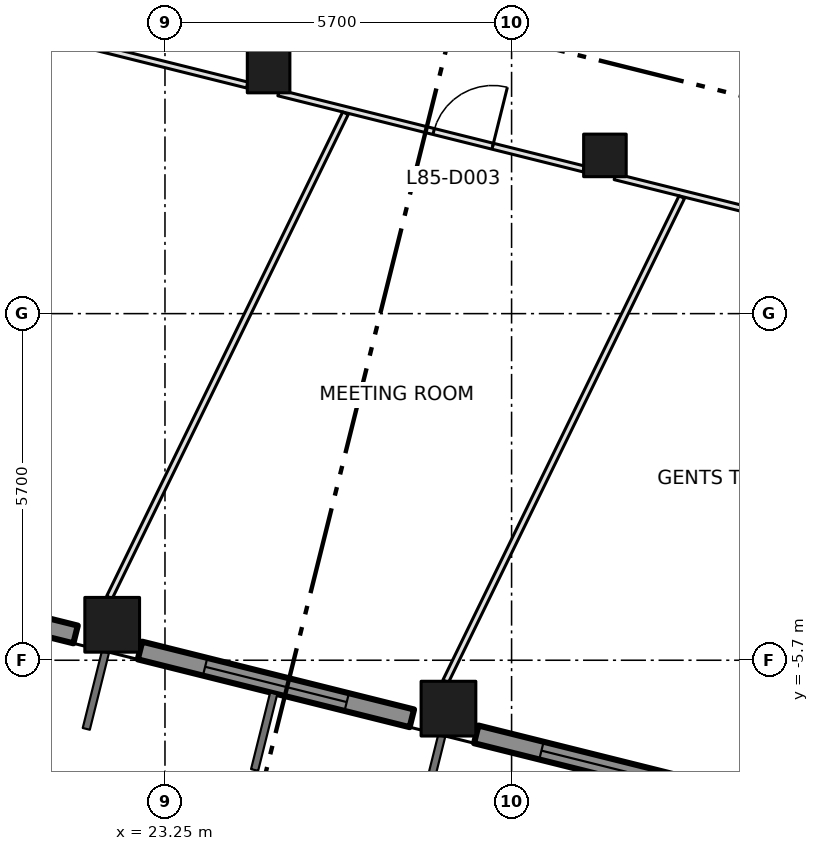
"""IFC4 building model, lengths in metres.
Left out: names, types, materials, properties, quantities, classifications, styles, units other than length and angle.
Written with IfcOpenShell. Run it as: python <this file> out.ifc"""

import sys

from ifc_helpers import new_model, si_unit, direction, frame, frame_2d, origin, origin_2d, place, context, subcontext, project, spatial, rectangle, extrude, element, fill, save


model = new_model("IFC4")
c1 = context("Model", 3, precision=1e-05, world=origin(), true_north=direction((0.0, 1.0)))
c2 = subcontext(c1, "Body", "Model", "MODEL_VIEW")
j1 = project(units=[si_unit("LENGTHUNIT", "METRE"), si_unit("PLANEANGLEUNIT", "RADIAN")], contexts=[c1])
p1 = place(None, origin())
s1 = spatial("IfcSite", under=j1, at=p1, CompositionType="ELEMENT")
p2 = place(p1, origin())
s2 = spatial("IfcBuilding", under=s1, at=p2, CompositionType="ELEMENT")
p3 = place(p2, frame((0.0, 0.0, 370.8)))
s3 = spatial("IfcBuildingStorey", under=s2, at=p3, CompositionType="ELEMENT", Elevation=370.8)
for number, where, z_axis, x_axis in (
    (1, (22.382, -5.117, 0.0), (0.0, 0.0, 1.0), (1.0, 0.0, 0.0)),
    (2, (27.912, -6.496, 0.0), (0.0, 0.0, 1.0), (1.0, 0.0, 0.0)),
):
    element("IfcColumn", number, at=place(p3, frame(where, z_axis=z_axis, x_axis=x_axis)), inside=s3, PredefinedType="COLUMN", context=c2, shape_type="SweptSolid", body=[
        extrude(rectangle(XDim=0.9, YDim=0.9, at=origin_2d()), origin(), (0.0, 0.0, 1.0), 4.2),
    ])
for number, where, z_axis, x_axis in (
    (3, (24.954, 3.981, 0.0), (0.0, 0.0, 1.0), (1.0, 0.0, 0.0)),
    (4, (30.485, 2.602, 0.0), (0.0, 0.0, 1.0), (1.0, 0.0, 0.0)),
):
    element("IfcColumn", number, at=place(p3, frame(where, z_axis=z_axis, x_axis=x_axis)), inside=s3, PredefinedType="COLUMN", context=c2, shape_type="SweptSolid", body=[
        extrude(rectangle(XDim=0.7, YDim=0.7, at=origin_2d()), origin(), (0.0, 0.0, 1.0), 4.2),
    ])
p4 = place(p3, frame((17.308, -4.161, 0.0), z_axis=(0.0, 0.0, 1.0), x_axis=(0.970294992984, -0.241924836652, 0.0)))
e5 = element("IfcWall", 5, at=p4, inside=s3, PredefinedType="SOLIDWALL", context=c2, shape_type="SweptSolid", body=[
    extrude(rectangle(XDim=4.609, YDim=0.3, at=frame_2d((2.304, 0.0))), origin(), (0.0, 0.0, 1.0), 3.2),
])
p5 = place(p4, frame((1.105, 0.0, 0.8)))
e6 = element("IfcOpeningElement", 6, at=p5, cuts=e5, PredefinedType="OPENING", context=c2, shape_type="SweptSolid", body=[
    extrude(rectangle(XDim=2.4, YDim=2.1, at=frame_2d((1.2, 1.05))), frame((0.0, 0.16, 0.0), z_axis=(0.0, -1.0, 0.0), x_axis=(1.0, 0.0, 0.0)), (0.0, 0.0, 1.0), 0.32),
])
p6 = place(p3, frame((22.839, -5.54, 0.0), z_axis=(0.0, 0.0, 1.0), x_axis=(0.970282587769, -0.241974585177, 0.0)))
e7 = element("IfcWall", 7, at=p6, inside=s3, PredefinedType="SOLIDWALL", context=c2, shape_type="SweptSolid", body=[
    extrude(rectangle(XDim=4.608, YDim=0.3, at=frame_2d((2.304, 0.0))), origin(), (0.0, 0.0, 1.0), 3.2),
])
p7 = place(p6, frame((1.104, 0.0, 0.8)))
e8 = element("IfcOpeningElement", 8, at=p7, cuts=e7, PredefinedType="OPENING", context=c2, shape_type="SweptSolid", body=[
    extrude(rectangle(XDim=2.4, YDim=2.1, at=frame_2d((1.2, 1.05))), frame((0.0, 0.16, 0.0), z_axis=(0.0, -1.0, 0.0), x_axis=(1.0, 0.0, 0.0)), (0.0, 0.0, 1.0), 0.32),
])
p8 = place(p3, frame((28.369, -6.919, 0.0), z_axis=(0.0, 0.0, 1.0), x_axis=(0.970298093093, -0.241912402618, 0.0)))
e9 = element("IfcWall", 9, at=p8, inside=s3, PredefinedType="SOLIDWALL", context=c2, shape_type="SweptSolid", body=[
    extrude(rectangle(XDim=4.609, YDim=0.3, at=frame_2d((2.305, 0.0))), origin(), (0.0, 0.0, 1.0), 3.2),
])
p9 = place(p8, frame((1.105, 0.0, 0.8)))
e10 = element("IfcOpeningElement", 10, at=p9, cuts=e9, PredefinedType="OPENING", context=c2, shape_type="SweptSolid", body=[
    extrude(rectangle(XDim=2.4, YDim=2.1, at=frame_2d((1.2, 1.05))), frame((0.0, 0.16, 0.0), z_axis=(0.0, -1.0, 0.0), x_axis=(1.0, 0.0, 0.0)), (0.0, 0.0, 1.0), 0.32),
])
p10 = place(p3, frame((19.586, 5.01, 0.0), z_axis=(0.0, 0.0, 1.0), x_axis=(0.970303347181, -0.241891327769, 0.0)))
e11 = element("IfcWall", 11, at=p10, inside=s3, PredefinedType="PARTITIONING", context=c2, shape_type="SweptSolid", body=[
    extrude(rectangle(XDim=5.172, YDim=0.1, at=frame_2d((2.586, 0.0))), origin(), (0.0, 0.0, 1.0), 3.9),
])
p11 = place(p3, frame((25.118, 3.631, 0.0), z_axis=(0.0, 0.0, 1.0), x_axis=(0.970281210621, -0.241980107272, 0.0)))
e12 = element("IfcWall", 12, at=p11, inside=s3, PredefinedType="PARTITIONING", context=c2, shape_type="SweptSolid", body=[
    extrude(rectangle(XDim=5.171, YDim=0.1, at=frame_2d((2.585, 0.0))), origin(), (0.0, 0.0, 1.0), 3.9),
])
p12 = place(p11, frame((2.629, 0.0, 0.0)))
e13 = element("IfcOpeningElement", 13, at=p12, cuts=e12, PredefinedType="OPENING", context=c2, shape_type="SweptSolid", body=[
    extrude(rectangle(XDim=1.0, YDim=2.1, at=frame_2d((0.5, 1.05))), frame((0.0, 0.06, 0.0), z_axis=(0.0, -1.0, 0.0), x_axis=(1.0, 0.0, 0.0)), (0.0, 0.0, 1.0), 0.12),
])
p13 = place(p3, frame((30.649, 2.252, 0.0), z_axis=(0.0, 0.0, 1.0), x_axis=(0.970292295429, -0.241935655561, 0.0)))
e14 = element("IfcWall", 14, at=p13, inside=s3, PredefinedType="PARTITIONING", context=c2, shape_type="SweptSolid", body=[
    extrude(rectangle(XDim=5.171, YDim=0.1, at=frame_2d((2.585, 0.0))), origin(), (0.0, 0.0, 1.0), 3.9),
])
p14 = place(p13, frame((2.729, 0.0, 0.0)))
e15 = element("IfcOpeningElement", 15, at=p14, cuts=e14, PredefinedType="OPENING", context=c2, shape_type="SweptSolid", body=[
    extrude(rectangle(XDim=1.0, YDim=2.1, at=frame_2d((0.5, 1.05))), frame((0.0, 0.06, 0.0), z_axis=(0.0, -1.0, 0.0), x_axis=(1.0, 0.0, 0.0)), (0.0, 0.0, 1.0), 0.12),
])
p15 = place(p3, frame((22.336, -4.667, 0.0), z_axis=(0.0, 0.0, 1.0), x_axis=(0.438261260169, 0.89884763327, 0.0)))
e16 = element("IfcWall", 16, at=p15, inside=s3, PredefinedType="PARTITIONING", context=c2, shape_type="SweptSolid", body=[
    extrude(rectangle(XDim=8.858, YDim=0.1, at=frame_2d((4.429, 0.0))), origin(), (0.0, 0.0, 1.0), 3.9),
])
p16 = place(p3, frame((27.866, -6.046, 0.0), z_axis=(0.0, 0.0, 1.0), x_axis=(0.438350325629, 0.898804201159, 0.0)))
e17 = element("IfcWall", 17, at=p16, inside=s3, PredefinedType="PARTITIONING", context=c2, shape_type="SweptSolid", body=[
    extrude(rectangle(XDim=8.858, YDim=0.1, at=frame_2d((4.429, 0.0))), origin(), (0.0, 0.0, 1.0), 3.9),
])
p17 = place(p7, origin())
e18 = element("IfcWindow", 18, at=p17, inside=s3, PartitioningType="DOUBLE_PANEL_VERTICAL", PredefinedType="WINDOW", context=c2, shape_type="SweptSolid", body=[
    extrude(rectangle(XDim=2.4, YDim=2.1, at=frame_2d((1.2, 1.05))), frame((0.0, 0.03, 0.0), z_axis=(0.0, -1.0, 0.0), x_axis=(1.0, 0.0, 0.0)), (0.0, 0.0, 1.0), 0.06),
])
fill(e8, e18)
p18 = place(p9, origin())
e19 = element("IfcWindow", 19, at=p18, inside=s3, PartitioningType="DOUBLE_PANEL_VERTICAL", PredefinedType="WINDOW", context=c2, shape_type="SweptSolid", body=[
    extrude(rectangle(XDim=2.4, YDim=2.1, at=frame_2d((1.2, 1.05))), frame((0.0, 0.03, 0.0), z_axis=(0.0, -1.0, 0.0), x_axis=(1.0, 0.0, 0.0)), (0.0, 0.0, 1.0), 0.06),
])
fill(e10, e19)
p19 = place(p12, origin())
e20 = element("IfcDoor", 20, at=p19, inside=s3, OperationType="SINGLE_SWING_RIGHT", PredefinedType="DOOR", context=c2, shape_type="SweptSolid", body=[
    extrude(rectangle(XDim=1.0, YDim=2.1, at=frame_2d((0.5, 1.05))), frame((0.0, 0.025, 0.0), z_axis=(0.0, -1.0, 0.0), x_axis=(1.0, 0.0, 0.0)), (0.0, 0.0, 1.0), 0.05),
])
fill(e13, e20)
save(model, sys.argv[1])
